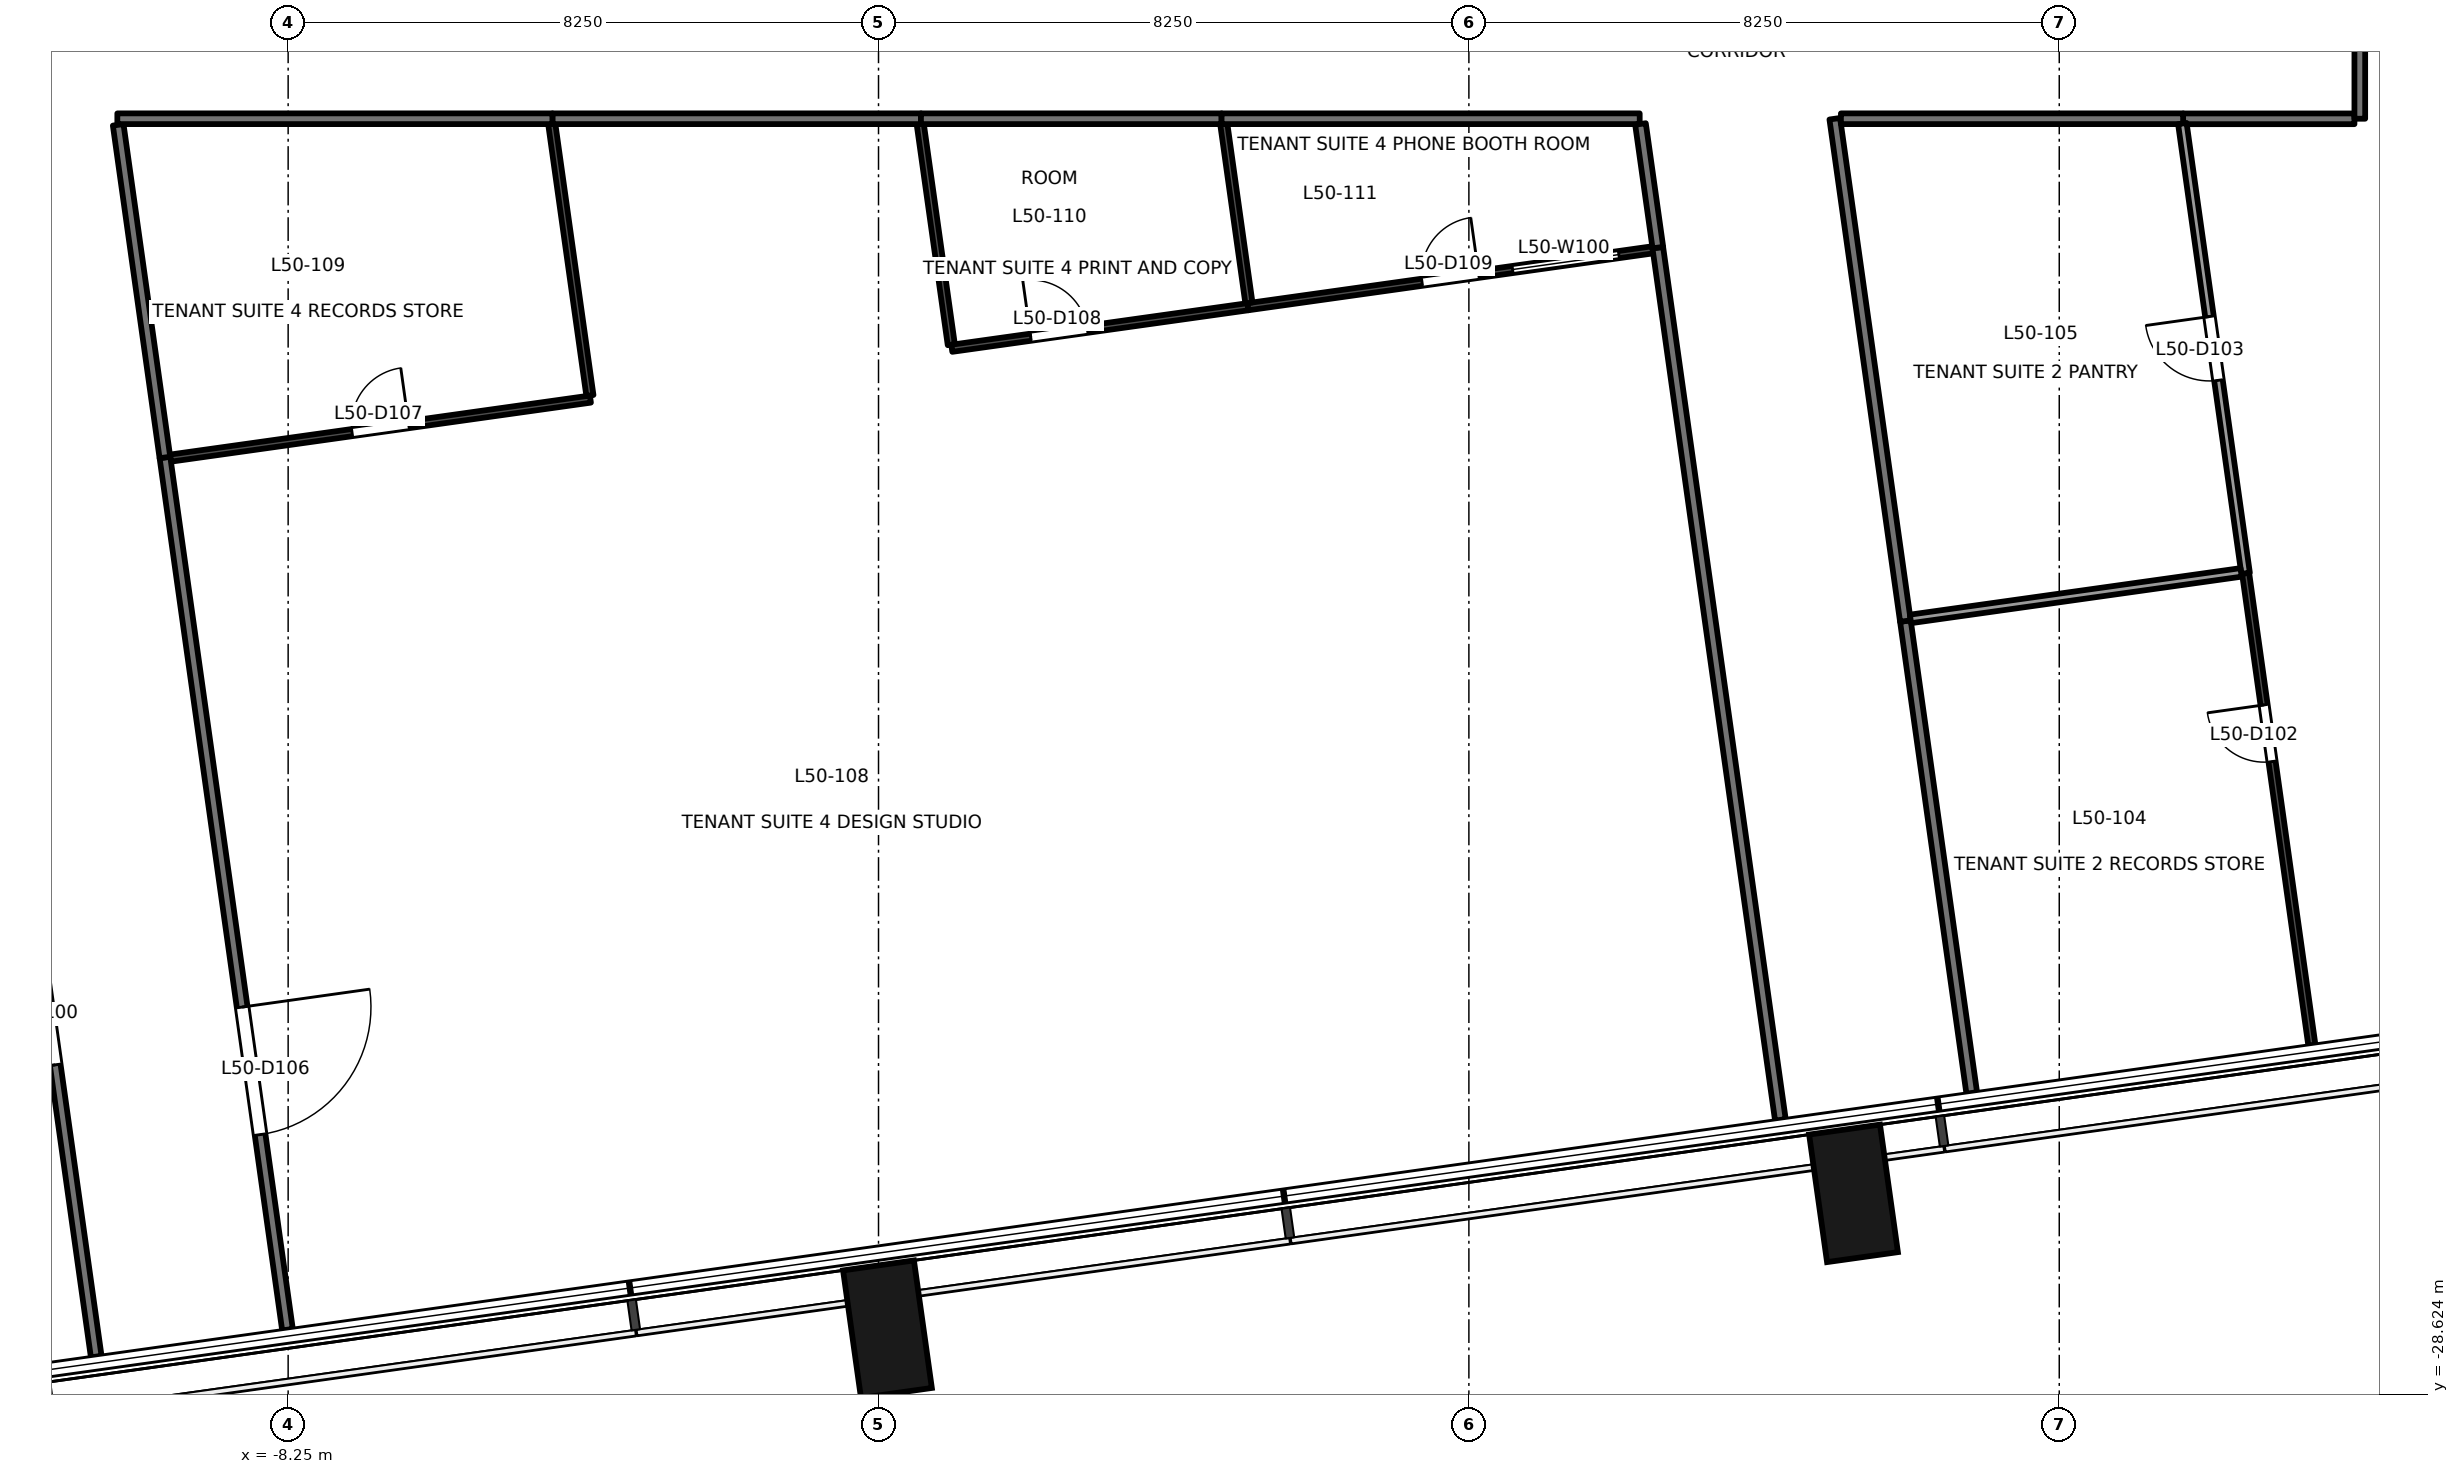
"""IFC4 building model, lengths in metres.
Left out: names, types, materials, properties, quantities, classifications, styles, units other than length and angle.
Written with IfcOpenShell. Run it as: python <this file> out.ifc"""

import sys

from ifc_helpers import new_model, si_unit, direction, frame, frame_2d, origin, origin_2d, place, context, subcontext, project, spatial, rectangle, extrude, element, fill, save


model = new_model("IFC4")
c1 = context("Model", 3, precision=1e-05, world=origin(), true_north=direction((0.0, 1.0)))
c2 = subcontext(c1, "Body", "Model", "MODEL_VIEW")
j1 = project(units=[si_unit("LENGTHUNIT", "METRE"), si_unit("PLANEANGLEUNIT", "RADIAN")], contexts=[c1])
p1 = place(None, origin())
s1 = spatial("IfcSite", under=j1, at=p1, CompositionType="ELEMENT")
p2 = place(p1, origin())
s2 = spatial("IfcBuilding", under=s1, at=p2, CompositionType="ELEMENT")
p3 = place(p2, frame((0.0, 0.0, 221.3)))
s3 = spatial("IfcBuildingStorey", under=s2, at=p3, CompositionType="ELEMENT", Elevation=221.3)
for number, where, z_axis, x_axis in (
    (1, (-11.971, -29.416, -0.2), (0.0, 0.0, 1.0), (0.99, 0.139, 0.0)),
    (2, (0.125, -27.716, -0.2), (0.0, 0.0, 1.0), (0.99, 0.139, 0.0)),
    (3, (13.625, -25.818, -0.2), (0.0, 0.0, 1.0), (0.99, 0.139, 0.0)),
):
    element("IfcColumn", number, at=place(p3, frame(where, z_axis=z_axis, x_axis=x_axis)), inside=s3, PredefinedType="COLUMN", context=c2, shape_type="SweptSolid", body=[
        extrude(rectangle(XDim=1.0, YDim=1.8, at=origin_2d()), origin(), (0.0, 0.0, 1.0), 3.9),
    ])
p4 = place(p3, frame((-10.932, -28.099, 0.0), z_axis=(0.0, 0.0, 1.0), x_axis=(-0.139168963114, 0.990268650269, 0.0)))
e4 = element("IfcWall", 4, at=p4, inside=s3, PredefinedType="PARTITIONING", context=c2, shape_type="SweptSolid", body=[
    extrude(rectangle(XDim=17.469, YDim=0.15, at=frame_2d((8.734, 0.0))), origin(), (0.0, 0.0, 1.0), 3.7),
])
p5 = place(p4, frame((4.117, 0.0, 0.0)))
e5 = element("IfcOpeningElement", 5, at=p5, cuts=e4, PredefinedType="OPENING", context=c2, shape_type="SweptSolid", body=[
    extrude(rectangle(XDim=1.5, YDim=2.1, at=frame_2d((0.75, 1.05))), frame((0.0, 0.085, 0.0), z_axis=(0.0, -1.0, 0.0), x_axis=(1.0, 0.0, 0.0)), (0.0, 0.0, 1.0), 0.171),
])
p6 = place(p3, frame((20.625, -10.801, 0.0), z_axis=(0.0, 0.0, 1.0), x_axis=(-1.0, 0.0, 0.0)))
e6 = element("IfcWall", 6, at=p6, inside=s3, PredefinedType="PARTITIONING", context=c2, shape_type="SweptSolid", body=[
    extrude(rectangle(XDim=2.394, YDim=0.15, at=frame_2d((1.197, 0.0))), origin(), (0.0, 0.0, 1.0), 3.7),
])
p7 = place(p3, frame((20.7, 3.261, 0.0), z_axis=(0.0, 0.0, 1.0), x_axis=(0.0, -1.0, 0.0)))
e7 = element("IfcWall", 7, at=p7, inside=s3, PredefinedType="PARTITIONING", context=c2, shape_type="SweptSolid", body=[
    extrude(rectangle(XDim=14.061, YDim=0.15, at=frame_2d((7.031, 0.0))), origin(), (0.0, 0.0, 1.0), 3.1),
])
p8 = place(p7, frame((3.19, 0.0, 0.0)))
e8 = element("IfcOpeningElement", 8, at=p8, cuts=e7, PredefinedType="OPENING", context=c2, shape_type="SweptSolid", body=[
    extrude(rectangle(XDim=1.8, YDim=2.1, at=frame_2d((0.9, 1.05))), frame((0.0, 0.085, 0.0), z_axis=(0.0, -1.0, 0.0), x_axis=(1.0, 0.0, 0.0)), (0.0, 0.0, 1.0), 0.171),
])
p9 = place(p3, frame((14.35, -17.82, 0.0), z_axis=(0.0, 0.0, 1.0), x_axis=(0.139193607275, -0.99026518655, 0.0)))
e9 = element("IfcWall", 9, at=p9, inside=s3, PredefinedType="PARTITIONING", context=c2, shape_type="SweptSolid", body=[
    extrude(rectangle(XDim=6.66, YDim=0.15, at=frame_2d((3.33, 0.0))), origin(), (0.0, 0.0, 1.0), 3.7),
])
p10 = place(p3, frame((13.363, -10.8, 0.0), z_axis=(0.0, 0.0, 1.0), x_axis=(0.139236890445, -0.990259101619, 0.0)))
e10 = element("IfcWall", 10, at=p10, inside=s3, PredefinedType="PARTITIONING", context=c2, shape_type="SweptSolid", body=[
    extrude(rectangle(XDim=7.089, YDim=0.15, at=frame_2d((3.544, 0.0))), origin(), (0.0, 0.0, 1.0), 2.9),
])
p11 = place(p3, frame((18.231, -10.8, 0.0), z_axis=(0.0, 0.0, 1.0), x_axis=(-1.0, 0.0, 0.0)))
e11 = element("IfcWall", 11, at=p11, inside=s3, PredefinedType="PARTITIONING", context=c2, shape_type="SweptSolid", body=[
    extrude(rectangle(XDim=4.782, YDim=0.15, at=frame_2d((2.391, 0.0))), origin(), (0.0, 0.0, 1.0), 2.9),
])
p12 = place(p3, frame((-9.972, -15.533, 0.0), z_axis=(0.0, 0.0, 1.0), x_axis=(0.139149686673, -0.990271359123, 0.0)))
e12 = element("IfcWall", 12, at=p12, inside=s3, PredefinedType="PARTITIONING", context=c2, shape_type="SweptSolid", body=[
    extrude(rectangle(XDim=12.31, YDim=0.15, at=frame_2d((6.155, 0.0))), origin(), (0.0, 0.0, 1.0), 2.8),
])
p13 = place(p12, frame((7.757, 0.0, 0.0)))
e13 = element("IfcOpeningElement", 13, at=p13, cuts=e12, PredefinedType="OPENING", context=c2, shape_type="SweptSolid", body=[
    extrude(rectangle(XDim=1.8, YDim=2.1, at=frame_2d((0.9, 1.05))), frame((0.0, 0.085, 0.0), z_axis=(0.0, -1.0, 0.0), x_axis=(1.0, 0.0, 0.0)), (0.0, 0.0, 1.0), 0.171),
])
p14 = place(p3, frame((0.593, -10.8, 0.0), z_axis=(0.0, 0.0, 1.0), x_axis=(-1.0, 0.0, 0.0)))
e14 = element("IfcWall", 14, at=p14, inside=s3, PredefinedType="PARTITIONING", context=c2, shape_type="SweptSolid", body=[
    extrude(rectangle(XDim=5.15, YDim=0.15, at=frame_2d((2.575, 0.0))), origin(), (0.0, 0.0, 1.0), 2.8),
])
p15 = place(p3, frame((12.603, -24.791, 0.0), z_axis=(0.0, 0.0, 1.0), x_axis=(-0.139180069817, 0.990267089308, 0.0)))
e15 = element("IfcWall", 15, at=p15, inside=s3, PredefinedType="PARTITIONING", context=c2, shape_type="SweptSolid", body=[
    extrude(rectangle(XDim=12.309, YDim=0.15, at=frame_2d((6.154, 0.0))), origin(), (0.0, 0.0, 1.0), 3.7),
])
p16 = place(p3, frame((-10.625, -10.885, 0.0), z_axis=(0.0, 0.0, 1.0), x_axis=(0.139112996275, -0.990276514044, 0.0)))
e16 = element("IfcWall", 16, at=p16, inside=s3, PredefinedType="PARTITIONING", context=c2, shape_type="SweptSolid", body=[
    extrude(rectangle(XDim=4.695, YDim=0.15, at=frame_2d((2.347, 0.0))), origin(), (0.0, 0.0, 1.0), 3.7),
])
p17 = place(p3, frame((-4.557, -10.8, 0.0), z_axis=(0.0, 0.0, 1.0), x_axis=(-1.0, 0.0, 0.0)))
e17 = element("IfcWall", 17, at=p17, inside=s3, PredefinedType="PARTITIONING", context=c2, shape_type="SweptSolid", body=[
    extrude(rectangle(XDim=6.08, YDim=0.15, at=frame_2d((3.04, 0.0))), origin(), (0.0, 0.0, 1.0), 2.8),
])
p18 = place(p3, frame((4.794, -10.8, 0.0), z_axis=(0.0, 0.0, 1.0), x_axis=(-1.0, 0.0, 0.0)))
e18 = element("IfcWall", 18, at=p18, inside=s3, PredefinedType="PARTITIONING", context=c2, shape_type="SweptSolid", body=[
    extrude(rectangle(XDim=4.201, YDim=0.15, at=frame_2d((2.101, 0.0))), origin(), (0.0, 0.0, 1.0), 2.8),
])
p19 = place(p3, frame((10.637, -10.8, 0.0), z_axis=(0.0, 0.0, 1.0), x_axis=(-1.0, 0.0, 0.0)))
e19 = element("IfcWall", 19, at=p19, inside=s3, PredefinedType="PARTITIONING", context=c2, shape_type="SweptSolid", body=[
    extrude(rectangle(XDim=5.843, YDim=0.15, at=frame_2d((2.921, 0.0))), origin(), (0.0, 0.0, 1.0), 2.8),
])
p20 = place(p3, frame((10.891, -12.601, 0.0), z_axis=(0.0, 0.0, 1.0), x_axis=(-0.139344862723, 0.990243914009, 0.0)))
e20 = element("IfcWall", 20, at=p20, inside=s3, PredefinedType="PARTITIONING", context=c2, shape_type="SweptSolid", body=[
    extrude(rectangle(XDim=1.745, YDim=0.15, at=frame_2d((0.873, 0.0))), origin(), (0.0, 0.0, 1.0), 3.7),
])
p21 = place(p3, frame((20.03, -23.746, 0.0), z_axis=(0.0, 0.0, 1.0), x_axis=(-0.139070003418, 0.990282552683, 0.0)))
e21 = element("IfcWall", 21, at=p21, inside=s3, PredefinedType="PARTITIONING", context=c2, shape_type="SweptSolid", body=[
    extrude(rectangle(XDim=6.659, YDim=0.1, at=frame_2d((3.329, 0.0))), origin(), (0.0, 0.0, 1.0), 3.7),
])
p22 = place(p21, frame((4.001, 0.0, 0.0)))
e22 = element("IfcOpeningElement", 22, at=p22, cuts=e21, PredefinedType="OPENING", context=c2, shape_type="SweptSolid", body=[
    extrude(rectangle(XDim=0.8, YDim=2.1, at=frame_2d((0.4, 1.05))), frame((0.0, 0.061, 0.0), z_axis=(0.0, -1.0, 0.0), x_axis=(1.0, 0.0, 0.0)), (0.0, 0.0, 1.0), 0.121),
])
p23 = place(p3, frame((19.104, -17.152, 0.0), z_axis=(0.0, 0.0, 1.0), x_axis=(-0.139283120935, 0.99025260021, 0.0)))
e23 = element("IfcWall", 23, at=p23, inside=s3, PredefinedType="PARTITIONING", context=c2, shape_type="SweptSolid", body=[
    extrude(rectangle(XDim=6.347, YDim=0.12, at=frame_2d((3.173, 0.0))), origin(), (0.0, 0.0, 1.0), 3.7),
])
p24 = place(p23, frame((2.723, 0.0, 0.0)))
e24 = element("IfcOpeningElement", 24, at=p24, cuts=e23, PredefinedType="OPENING", context=c2, shape_type="SweptSolid", body=[
    extrude(rectangle(XDim=0.9, YDim=2.1, at=frame_2d((0.45, 1.05))), frame((0.0, 0.071, 0.0), z_axis=(0.0, -1.0, 0.0), x_axis=(1.0, 0.0, 0.0)), (0.0, 0.0, 1.0), 0.141),
])
p25 = place(p3, frame((14.421, -17.79, 0.0), z_axis=(0.0, 0.0, 1.0), x_axis=(0.990243495755, 0.139347834982, 0.0)))
e25 = element("IfcWall", 25, at=p25, inside=s3, PredefinedType="PARTITIONING", context=c2, shape_type="SweptSolid", body=[
    extrude(rectangle(XDim=4.666, YDim=0.12, at=frame_2d((2.333, 0.0))), origin(), (0.0, 0.0, 1.0), 3.7),
])
p26 = place(p3, frame((-9.895, -15.543, 0.0), z_axis=(0.0, 0.0, 1.0), x_axis=(0.990265807236, 0.139189191458, 0.0)))
e26 = element("IfcWall", 26, at=p26, inside=s3, PredefinedType="PARTITIONING", context=c2, shape_type="SweptSolid", body=[
    extrude(rectangle(XDim=5.927, YDim=0.1, at=frame_2d((2.963, 0.0))), origin(), (0.0, 0.0, 1.0), 2.8),
])
p27 = place(p26, frame((2.563, 0.0, 0.0)))
e27 = element("IfcOpeningElement", 27, at=p27, cuts=e26, PredefinedType="OPENING", context=c2, shape_type="SweptSolid", body=[
    extrude(rectangle(XDim=0.8, YDim=2.1, at=frame_2d((0.4, 1.05))), frame((0.0, 0.061, 0.0), z_axis=(0.0, -1.0, 0.0), x_axis=(1.0, 0.0, 0.0)), (0.0, 0.0, 1.0), 0.121),
])
p28 = place(p3, frame((-4.033, -14.668, 0.0), z_axis=(0.0, 0.0, 1.0), x_axis=(-0.139140777399, 0.990272610984, 0.0)))
e28 = element("IfcWall", 28, at=p28, inside=s3, PredefinedType="PARTITIONING", context=c2, shape_type="SweptSolid", body=[
    extrude(rectangle(XDim=3.837, YDim=0.1, at=frame_2d((1.919, 0.0))), origin(), (0.0, 0.0, 1.0), 2.8),
])
p29 = place(p3, frame((0.582, -10.868, 0.0), z_axis=(0.0, 0.0, 1.0), x_axis=(0.139416658497, -0.990233808418, 0.0)))
e29 = element("IfcWall", 29, at=p29, inside=s3, PredefinedType="PARTITIONING", context=c2, shape_type="SweptSolid", body=[
    extrude(rectangle(XDim=3.121, YDim=0.1, at=frame_2d((1.56, 0.0))), origin(), (0.0, 0.0, 1.0), 3.7),
])
p30 = place(p3, frame((1.024, -14.008, 0.0), z_axis=(0.0, 0.0, 1.0), x_axis=(0.990290027482, 0.139016766864, 0.0)))
e30 = element("IfcWall", 30, at=p30, inside=s3, PredefinedType="PARTITIONING", context=c2, shape_type="SweptSolid", body=[
    extrude(rectangle(XDim=4.18, YDim=0.1, at=frame_2d((2.09, 0.0))), origin(), (0.0, 0.0, 1.0), 2.8),
])
p31 = place(p30, frame((1.114, 0.0, 0.0)))
e31 = element("IfcOpeningElement", 31, at=p31, cuts=e30, PredefinedType="OPENING", context=c2, shape_type="SweptSolid", body=[
    extrude(rectangle(XDim=0.8, YDim=2.1, at=frame_2d((0.4, 1.05))), frame((0.0, 0.061, 0.0), z_axis=(0.0, -1.0, 0.0), x_axis=(1.0, 0.0, 0.0)), (0.0, 0.0, 1.0), 0.121),
])
p32 = place(p3, frame((5.163, -13.427, 0.0), z_axis=(0.0, 0.0, 1.0), x_axis=(0.9902675357, 0.139176893695, 0.0)))
e32 = element("IfcWall", 32, at=p32, inside=s3, PredefinedType="PARTITIONING", context=c2, shape_type="SweptSolid", body=[
    extrude(rectangle(XDim=5.712, YDim=0.1, at=frame_2d((2.856, 0.0))), origin(), (0.0, 0.0, 1.0), 2.8),
])
p33 = place(p32, frame((2.456, 0.0, 0.0)))
e33 = element("IfcOpeningElement", 33, at=p33, cuts=e32, PredefinedType="OPENING", context=c2, shape_type="SweptSolid", body=[
    extrude(rectangle(XDim=0.8, YDim=2.1, at=frame_2d((0.4, 1.05))), frame((0.0, 0.061, 0.0), z_axis=(0.0, -1.0, 0.0), x_axis=(1.0, 0.0, 0.0)), (0.0, 0.0, 1.0), 0.121),
])
p34 = place(p32, frame((3.734, 0.0, 0.9)))
e34 = element("IfcOpeningElement", 34, at=p34, cuts=e32, PredefinedType="OPENING", context=c2, shape_type="SweptSolid", body=[
    extrude(rectangle(XDim=1.5, YDim=1.2, at=frame_2d((0.75, 0.6))), frame((0.0, 0.061, 0.0), z_axis=(0.0, -1.0, 0.0), x_axis=(1.0, 0.0, 0.0)), (0.0, 0.0, 1.0), 0.121),
])
p35 = place(p3, frame((4.824, -10.868, 0.0), z_axis=(0.0, 0.0, 1.0), x_axis=(0.139111451168, -0.990276731098, 0.0)))
e35 = element("IfcWall", 35, at=p35, inside=s3, PredefinedType="PARTITIONING", context=c2, shape_type="SweptSolid", body=[
    extrude(rectangle(XDim=2.531, YDim=0.1, at=frame_2d((1.265, 0.0))), origin(), (0.0, 0.0, 1.0), 3.7),
])
p36 = place(p5, origin())
e36 = element("IfcDoor", 36, at=p36, inside=s3, OperationType="DOUBLE_DOOR_SINGLE_SWING", PredefinedType="DOOR", context=c2, shape_type="SweptSolid", body=[
    extrude(rectangle(XDim=1.5, YDim=2.1, at=frame_2d((0.75, 1.05))), frame((0.0, 0.025, 0.0), z_axis=(0.0, -1.0, 0.0), x_axis=(1.0, 0.0, 0.0)), (0.0, 0.0, 1.0), 0.05),
])
fill(e5, e36)
p37 = place(p22, origin())
e37 = element("IfcDoor", 37, at=p37, inside=s3, OperationType="SINGLE_SWING_RIGHT", PredefinedType="DOOR", context=c2, shape_type="SweptSolid", body=[
    extrude(rectangle(XDim=0.8, YDim=2.1, at=frame_2d((0.4, 1.05))), frame((0.0, 0.025, 0.0), z_axis=(0.0, -1.0, 0.0), x_axis=(1.0, 0.0, 0.0)), (0.0, 0.0, 1.0), 0.05),
])
fill(e22, e37)
p38 = place(p24, origin())
e38 = element("IfcDoor", 38, at=p38, inside=s3, OperationType="SINGLE_SWING_RIGHT", PredefinedType="DOOR", context=c2, shape_type="SweptSolid", body=[
    extrude(rectangle(XDim=0.9, YDim=2.1, at=frame_2d((0.45, 1.05))), frame((0.0, 0.025, 0.0), z_axis=(0.0, -1.0, 0.0), x_axis=(1.0, 0.0, 0.0)), (0.0, 0.0, 1.0), 0.05),
])
fill(e24, e38)
p39 = place(p13, origin())
e39 = element("IfcDoor", 39, at=p39, inside=s3, OperationType="DOUBLE_DOOR_SINGLE_SWING", PredefinedType="DOOR", context=c2, shape_type="SweptSolid", body=[
    extrude(rectangle(XDim=1.8, YDim=2.1, at=frame_2d((0.9, 1.05))), frame((0.0, 0.025, 0.0), z_axis=(0.0, -1.0, 0.0), x_axis=(1.0, 0.0, 0.0)), (0.0, 0.0, 1.0), 0.05),
])
fill(e13, e39)
p40 = place(p27, origin())
e40 = element("IfcDoor", 40, at=p40, inside=s3, OperationType="SINGLE_SWING_RIGHT", PredefinedType="DOOR", context=c2, shape_type="SweptSolid", body=[
    extrude(rectangle(XDim=0.8, YDim=2.1, at=frame_2d((0.4, 1.05))), frame((0.0, 0.025, 0.0), z_axis=(0.0, -1.0, 0.0), x_axis=(1.0, 0.0, 0.0)), (0.0, 0.0, 1.0), 0.05),
])
fill(e27, e40)
p41 = place(p31, origin())
e41 = element("IfcDoor", 41, at=p41, inside=s3, OperationType="SINGLE_SWING_LEFT", PredefinedType="DOOR", context=c2, shape_type="SweptSolid", body=[
    extrude(rectangle(XDim=0.8, YDim=2.1, at=frame_2d((0.4, 1.05))), frame((0.0, 0.025, 0.0), z_axis=(0.0, -1.0, 0.0), x_axis=(1.0, 0.0, 0.0)), (0.0, 0.0, 1.0), 0.05),
])
fill(e31, e41)
p42 = place(p33, origin())
e42 = element("IfcDoor", 42, at=p42, inside=s3, OperationType="SINGLE_SWING_RIGHT", PredefinedType="DOOR", context=c2, shape_type="SweptSolid", body=[
    extrude(rectangle(XDim=0.8, YDim=2.1, at=frame_2d((0.4, 1.05))), frame((0.0, 0.025, 0.0), z_axis=(0.0, -1.0, 0.0), x_axis=(1.0, 0.0, 0.0)), (0.0, 0.0, 1.0), 0.05),
])
fill(e33, e42)
p43 = place(p34, origin())
e43 = element("IfcWindow", 43, at=p43, inside=s3, PartitioningType="SINGLE_PANEL", PredefinedType="WINDOW", context=c2, shape_type="SweptSolid", body=[
    extrude(rectangle(XDim=1.5, YDim=1.2, at=frame_2d((0.75, 0.6))), frame((0.0, 0.03, 0.0), z_axis=(0.0, -1.0, 0.0), x_axis=(1.0, 0.0, 0.0)), (0.0, 0.0, 1.0), 0.06),
])
fill(e34, e43)
save(model, sys.argv[1])
